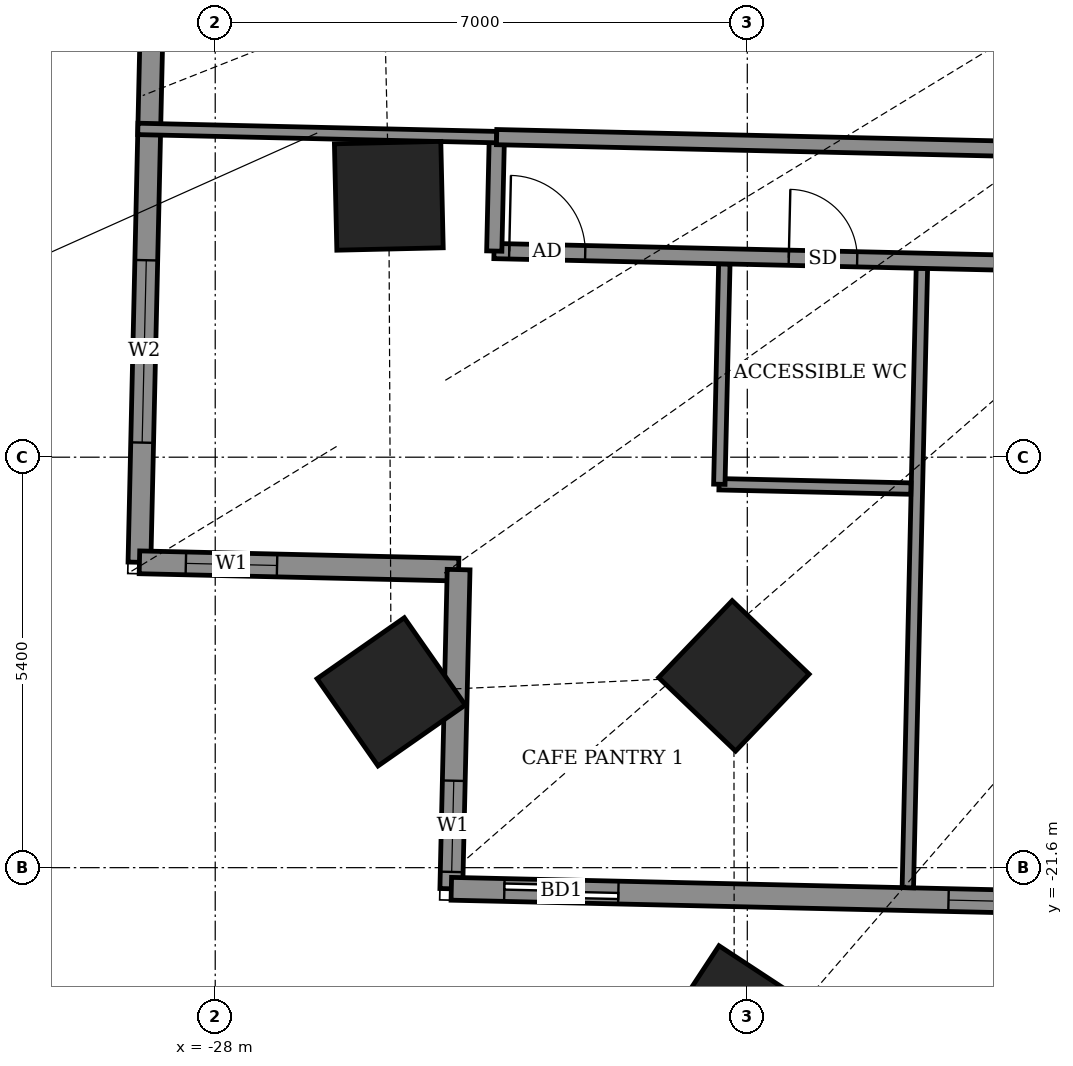
"""IFC4 building model, lengths in metres.
Left out: names, types, materials, properties, quantities, classifications, styles, units other than length and angle.
Written with IfcOpenShell. Run it as: python <this file> out.ifc"""

import sys

from ifc_helpers import new_model, si_unit, direction, frame, frame_2d, origin, origin_2d, place, context, subcontext, project, spatial, rectangle, extrude, element, fill, save


model = new_model("IFC4")
c1 = context("Model", 3, precision=1e-05, world=origin(), true_north=direction((0.0, 1.0)))
c2 = subcontext(c1, "Body", "Model", "MODEL_VIEW")
j1 = project(units=[si_unit("LENGTHUNIT", "METRE"), si_unit("PLANEANGLEUNIT", "RADIAN")], contexts=[c1])
p1 = place(None, origin())
s1 = spatial("IfcSite", under=j1, at=p1, CompositionType="ELEMENT")
p2 = place(p1, origin())
s2 = spatial("IfcBuilding", under=s1, at=p2, CompositionType="ELEMENT")
p3 = place(p2, frame((0.0, 0.0, 97.3)))
s3 = spatial("IfcBuildingStorey", under=s2, at=p3, CompositionType="ELEMENT", Elevation=97.3)
for number, where, z_axis, x_axis in (
    (1, (-25.716, -12.761, -0.55), (0.0, 0.0, 1.0), (0.023, -1.0, 0.0)),
    (2, (-25.685, -19.287, -0.55), (0.0, 0.0, 1.0), (0.573, -0.82, 0.0)),
    (3, (-21.177, -19.077, -0.55), (0.0, 0.0, 1.0), (0.723, -0.691, 0.0)),
    (4, (-21.172, -23.597, -0.55), (0.0, 0.0, 1.0), (0.836, -0.549, 0.0)),
):
    element("IfcColumn", number, at=place(p3, frame(where, z_axis=z_axis, x_axis=x_axis)), inside=s3, PredefinedType="COLUMN", context=c2, shape_type="SweptSolid", body=[
        extrude(rectangle(XDim=1.4, YDim=1.4, at=origin_2d()), origin(), (0.0, 0.0, 1.0), 4.6),
    ])
p4 = place(p3, frame((-28.702, -4.557, 0.0), z_axis=(0.0, 0.0, 1.0), x_axis=(-0.022653729471, -0.999743371341, 0.0)))
e5 = element("IfcWall", 5, at=p4, inside=s3, PredefinedType="SOLIDWALL", context=c2, shape_type="SweptSolid", body=[
    extrude(rectangle(XDim=13.03, YDim=0.3, at=frame_2d((6.515, 0.0))), origin(), (0.0, 0.0, 1.0), 2.85),
])
p5 = place(p4, frame((2.942, 0.0, 0.0)))
e6 = element("IfcOpeningElement", 6, at=p5, cuts=e5, PredefinedType="OPENING", context=c2, shape_type="SweptSolid", body=[
    extrude(rectangle(XDim=1.5, YDim=2.4, at=frame_2d((0.75, 1.2))), frame((0.0, 0.16, 0.0), z_axis=(0.0, -1.0, 0.0), x_axis=(1.0, 0.0, 0.0)), (0.0, 0.0, 1.0), 0.32),
])
p6 = place(p4, frame((9.054, 0.0, 0.9)))
e7 = element("IfcOpeningElement", 7, at=p6, cuts=e5, PredefinedType="OPENING", context=c2, shape_type="SweptSolid", body=[
    extrude(rectangle(XDim=2.4, YDim=1.5, at=frame_2d((1.2, 0.75))), frame((0.0, 0.16, 0.0), z_axis=(0.0, -1.0, 0.0), x_axis=(1.0, 0.0, 0.0)), (0.0, 0.0, 1.0), 0.32),
])
p7 = place(p3, frame((-28.997, -17.583, 0.0), z_axis=(0.0, 0.0, 1.0), x_axis=(0.999739037152, -0.022844202663, 0.0)))
e8 = element("IfcWall", 8, at=p7, inside=s3, PredefinedType="SOLIDWALL", context=c2, shape_type="SweptSolid", body=[
    extrude(rectangle(XDim=4.2, YDim=0.3, at=frame_2d((2.1, 0.0))), origin(), (0.0, 0.0, 1.0), 2.55),
])
p8 = place(p7, frame((0.611, 0.0, 0.9)))
e9 = element("IfcOpeningElement", 9, at=p8, cuts=e8, PredefinedType="OPENING", context=c2, shape_type="SweptSolid", body=[
    extrude(rectangle(XDim=1.2, YDim=1.5, at=frame_2d((0.6, 0.75))), frame((0.0, 0.16, 0.0), z_axis=(0.0, -1.0, 0.0), x_axis=(1.0, 0.0, 0.0)), (0.0, 0.0, 1.0), 0.32),
])
p9 = place(p3, frame((-24.798, -17.679, 0.0), z_axis=(0.0, 0.0, 1.0), x_axis=(-0.022844202663, -0.999739037152, 0.0)))
e10 = element("IfcWall", 10, at=p9, inside=s3, PredefinedType="SOLIDWALL", context=c2, shape_type="SweptSolid", body=[
    extrude(rectangle(XDim=4.2, YDim=0.3, at=frame_2d((2.1, 0.0))), origin(), (0.0, 0.0, 1.0), 2.55),
])
p10 = place(p9, frame((2.778, 0.0, 0.9)))
e11 = element("IfcOpeningElement", 11, at=p10, cuts=e10, PredefinedType="OPENING", context=c2, shape_type="SweptSolid", body=[
    extrude(rectangle(XDim=1.2, YDim=1.5, at=frame_2d((0.6, 0.75))), frame((0.0, 0.16, 0.0), z_axis=(0.0, -1.0, 0.0), x_axis=(1.0, 0.0, 0.0)), (0.0, 0.0, 1.0), 0.32),
])
p11 = place(p3, frame((-24.894, -21.878, 0.0), z_axis=(0.0, 0.0, 1.0), x_axis=(0.999742689045, -0.022683820265, 0.0)))
e12 = element("IfcWall", 12, at=p11, inside=s3, PredefinedType="SOLIDWALL", context=c2, shape_type="SweptSolid", body=[
    extrude(rectangle(XDim=44.708, YDim=0.3, at=frame_2d((22.354, 0.0))), origin(), (0.0, 0.0, 1.0), 2.45),
])
p12 = place(p11, frame((0.698, 0.0, 0.0)))
e13 = element("IfcOpeningElement", 13, at=p12, cuts=e12, PredefinedType="OPENING", context=c2, shape_type="SweptSolid", body=[
    extrude(rectangle(XDim=1.5, YDim=2.4, at=frame_2d((0.75, 1.2))), frame((0.0, 0.16, 0.0), z_axis=(0.0, -1.0, 0.0), x_axis=(1.0, 0.0, 0.0)), (0.0, 0.0, 1.0), 0.32),
])
p13 = place(p11, frame((6.543, 0.0, 0.9)))
e14 = element("IfcOpeningElement", 14, at=p13, cuts=e12, PredefinedType="OPENING", context=c2, shape_type="SweptSolid", body=[
    extrude(rectangle(XDim=2.4, YDim=1.5, at=frame_2d((1.2, 0.75))), frame((0.0, 0.16, 0.0), z_axis=(0.0, -1.0, 0.0), x_axis=(1.0, 0.0, 0.0)), (0.0, 0.0, 1.0), 0.32),
])
p14 = place(p11, frame((18.48, 0.0, 0.9)))
e15 = element("IfcOpeningElement", 15, at=p14, cuts=e12, PredefinedType="OPENING", context=c2, shape_type="SweptSolid", body=[
    extrude(rectangle(XDim=2.4, YDim=1.5, at=frame_2d((1.2, 0.75))), frame((0.0, 0.16, 0.0), z_axis=(0.0, -1.0, 0.0), x_axis=(1.0, 0.0, 0.0)), (0.0, 0.0, 1.0), 0.32),
])
p15 = place(p11, frame((24.76, 0.0, 0.0)))
e16 = element("IfcOpeningElement", 16, at=p15, cuts=e12, PredefinedType="OPENING", context=c2, shape_type="SweptSolid", body=[
    extrude(rectangle(XDim=1.5, YDim=2.4, at=frame_2d((0.75, 1.2))), frame((0.0, 0.16, 0.0), z_axis=(0.0, -1.0, 0.0), x_axis=(1.0, 0.0, 0.0)), (0.0, 0.0, 1.0), 0.32),
])
p16 = place(p11, frame((27.61, 0.0, 0.0)))
e17 = element("IfcOpeningElement", 17, at=p16, cuts=e12, PredefinedType="OPENING", context=c2, shape_type="SweptSolid", body=[
    extrude(rectangle(XDim=1.5, YDim=2.4, at=frame_2d((0.75, 1.2))), frame((0.0, 0.16, 0.0), z_axis=(0.0, -1.0, 0.0), x_axis=(1.0, 0.0, 0.0)), (0.0, 0.0, 1.0), 0.32),
])
p17 = place(p11, frame((33.44, 0.0, 0.0)))
e18 = element("IfcOpeningElement", 18, at=p17, cuts=e12, PredefinedType="OPENING", context=c2, shape_type="SweptSolid", body=[
    extrude(rectangle(XDim=1.5, YDim=2.4, at=frame_2d((0.75, 1.2))), frame((0.0, 0.16, 0.0), z_axis=(0.0, -1.0, 0.0), x_axis=(1.0, 0.0, 0.0)), (0.0, 0.0, 1.0), 0.32),
])
p18 = place(p11, frame((38.795, 0.0, 0.9)))
e19 = element("IfcOpeningElement", 19, at=p18, cuts=e12, PredefinedType="OPENING", context=c2, shape_type="SweptSolid", body=[
    extrude(rectangle(XDim=2.4, YDim=1.5, at=frame_2d((1.2, 0.75))), frame((0.0, 0.16, 0.0), z_axis=(0.0, -1.0, 0.0), x_axis=(1.0, 0.0, 0.0)), (0.0, 0.0, 1.0), 0.32),
])
p19 = place(p3, frame((-18.888, -21.864, 0.0), z_axis=(0.0, 0.0, 1.0), x_axis=(0.022706435224, 0.999742175663, 0.0)))
e20 = element("IfcWall", 20, at=p19, inside=s3, PredefinedType="PARTITIONING", context=c2, shape_type="SweptSolid", body=[
    extrude(rectangle(XDim=8.15, YDim=0.15, at=frame_2d((4.075, 0.0))), origin(), (0.0, 0.0, 1.0), 2.45),
])
p20 = place(p3, frame((-21.372, -16.556, 0.0), z_axis=(0.0, 0.0, 1.0), x_axis=(0.999743977673, -0.022626955293, 0.0)))
e21 = element("IfcWall", 21, at=p20, inside=s3, PredefinedType="PARTITIONING", context=c2, shape_type="SweptSolid", body=[
    extrude(rectangle(XDim=2.525, YDim=0.15, at=frame_2d((1.262, 0.0))), origin(), (0.0, 0.0, 1.0), 2.85),
])
p21 = place(p3, frame((-21.368, -16.556, 0.0), z_axis=(0.0, 0.0, 1.0), x_axis=(0.022732880677, 0.999741574676, 0.0)))
e22 = element("IfcWall", 22, at=p21, inside=s3, PredefinedType="PARTITIONING", context=c2, shape_type="SweptSolid", body=[
    extrude(rectangle(XDim=2.9, YDim=0.15, at=frame_2d((1.45, 0.0))), origin(), (0.0, 0.0, 1.0), 2.75),
])
p22 = place(p3, frame((-24.332, -13.488, 0.0), z_axis=(0.0, 0.0, 1.0), x_axis=(0.999742555853, -0.022689689667, 0.0)))
e23 = element("IfcWall", 23, at=p22, inside=s3, PredefinedType="PARTITIONING", context=c2, shape_type="SweptSolid", body=[
    extrude(rectangle(XDim=48.086, YDim=0.2, at=frame_2d((24.043, 0.0))), origin(), (0.0, 0.0, 1.0), 2.45),
])
p23 = place(p22, frame((0.2, 0.0, 0.0)))
e24 = element("IfcOpeningElement", 24, at=p23, cuts=e23, PredefinedType="OPENING", context=c2, shape_type="SweptSolid", body=[
    extrude(rectangle(XDim=1.0, YDim=2.1, at=frame_2d((0.5, 1.05))), frame((0.0, 0.11, 0.0), z_axis=(0.0, -1.0, 0.0), x_axis=(1.0, 0.0, 0.0)), (0.0, 0.0, 1.0), 0.22),
])
p24 = place(p22, frame((3.879, 0.0, 0.0)))
e25 = element("IfcOpeningElement", 25, at=p24, cuts=e23, PredefinedType="OPENING", context=c2, shape_type="SweptSolid", body=[
    extrude(rectangle(XDim=0.9, YDim=2.1, at=frame_2d((0.45, 1.05))), frame((0.0, 0.11, 0.0), z_axis=(0.0, -1.0, 0.0), x_axis=(1.0, 0.0, 0.0)), (0.0, 0.0, 1.0), 0.22),
])
p25 = place(p22, frame((8.929, 0.0, 0.0)))
e26 = element("IfcOpeningElement", 26, at=p25, cuts=e23, PredefinedType="OPENING", context=c2, shape_type="SweptSolid", body=[
    extrude(rectangle(XDim=1.0, YDim=2.1, at=frame_2d((0.5, 1.05))), frame((0.0, 0.11, 0.0), z_axis=(0.0, -1.0, 0.0), x_axis=(1.0, 0.0, 0.0)), (0.0, 0.0, 1.0), 0.22),
])
p26 = place(p22, frame((17.004, 0.0, 0.0)))
e27 = element("IfcOpeningElement", 27, at=p26, cuts=e23, PredefinedType="OPENING", context=c2, shape_type="SweptSolid", body=[
    extrude(rectangle(XDim=1.0, YDim=2.1, at=frame_2d((0.5, 1.05))), frame((0.0, 0.11, 0.0), z_axis=(0.0, -1.0, 0.0), x_axis=(1.0, 0.0, 0.0)), (0.0, 0.0, 1.0), 0.22),
])
p27 = place(p22, frame((25.054, 0.0, 0.0)))
e28 = element("IfcOpeningElement", 28, at=p27, cuts=e23, PredefinedType="OPENING", context=c2, shape_type="SweptSolid", body=[
    extrude(rectangle(XDim=0.9, YDim=2.1, at=frame_2d((0.45, 1.05))), frame((0.0, 0.11, 0.0), z_axis=(0.0, -1.0, 0.0), x_axis=(1.0, 0.0, 0.0)), (0.0, 0.0, 1.0), 0.22),
])
p28 = place(p22, frame((27.679, 0.0, 0.0)))
e29 = element("IfcOpeningElement", 29, at=p28, cuts=e23, PredefinedType="OPENING", context=c2, shape_type="SweptSolid", body=[
    extrude(rectangle(XDim=0.9, YDim=2.1, at=frame_2d((0.45, 1.05))), frame((0.0, 0.11, 0.0), z_axis=(0.0, -1.0, 0.0), x_axis=(1.0, 0.0, 0.0)), (0.0, 0.0, 1.0), 0.22),
])
p29 = place(p22, frame((35.079, 0.0, 0.0)))
e30 = element("IfcOpeningElement", 30, at=p29, cuts=e23, PredefinedType="OPENING", context=c2, shape_type="SweptSolid", body=[
    extrude(rectangle(XDim=0.9, YDim=2.1, at=frame_2d((0.45, 1.05))), frame((0.0, 0.11, 0.0), z_axis=(0.0, -1.0, 0.0), x_axis=(1.0, 0.0, 0.0)), (0.0, 0.0, 1.0), 0.22),
])
p30 = place(p22, frame((41.675, 0.0, 0.0)))
e31 = element("IfcOpeningElement", 31, at=p30, cuts=e23, PredefinedType="OPENING", context=c2, shape_type="SweptSolid", body=[
    extrude(rectangle(XDim=1.0, YDim=2.1, at=frame_2d((0.5, 1.05))), frame((0.0, 0.11, 0.0), z_axis=(0.0, -1.0, 0.0), x_axis=(1.0, 0.0, 0.0)), (0.0, 0.0, 1.0), 0.22),
])
p31 = place(p3, frame((-24.329, -13.488, 0.0), z_axis=(0.0, 0.0, 1.0), x_axis=(0.02279537805, 0.999740151609, 0.0)))
e32 = element("IfcWall", 32, at=p31, inside=s3, PredefinedType="PARTITIONING", context=c2, shape_type="SweptSolid", body=[
    extrude(rectangle(XDim=1.5, YDim=0.2, at=frame_2d((0.75, 0.0))), origin(), (0.0, 0.0, 1.0), 4.05),
])
p32 = place(p3, frame((-29.018, -11.881, 0.0), z_axis=(0.0, 0.0, 1.0), x_axis=(0.999738756298, -0.022856490471, 0.0)))
e33 = element("IfcWall", 33, at=p32, inside=s3, PredefinedType="PARTITIONING", context=c2, shape_type="SweptSolid", body=[
    extrude(rectangle(XDim=4.721, YDim=0.15, at=frame_2d((2.361, 0.0))), origin(), (0.0, 0.0, 1.0), 2.55),
])
p33 = place(p3, frame((-24.298, -11.989, 0.0), z_axis=(0.0, 0.0, 1.0), x_axis=(0.999742853322, -0.022676578901, 0.0)))
e34 = element("IfcWall", 34, at=p33, inside=s3, PredefinedType="PARTITIONING", context=c2, shape_type="SweptSolid", body=[
    extrude(rectangle(XDim=7.052, YDim=0.2, at=frame_2d((3.526, 0.0))), origin(), (0.0, 0.0, 1.0), 2.75),
])
p34 = place(p6, origin())
e35 = element("IfcWindow", 35, at=p34, inside=s3, PartitioningType="DOUBLE_PANEL_VERTICAL", PredefinedType="WINDOW", context=c2, shape_type="SweptSolid", body=[
    extrude(rectangle(XDim=2.4, YDim=1.5, at=frame_2d((1.2, 0.75))), frame((0.0, 0.03, 0.0), z_axis=(0.0, -1.0, 0.0), x_axis=(1.0, 0.0, 0.0)), (0.0, 0.0, 1.0), 0.06),
])
fill(e7, e35)
p35 = place(p8, origin())
e36 = element("IfcWindow", 36, at=p35, inside=s3, PartitioningType="SINGLE_PANEL", PredefinedType="WINDOW", context=c2, shape_type="SweptSolid", body=[
    extrude(rectangle(XDim=1.2, YDim=1.5, at=frame_2d((0.6, 0.75))), frame((0.0, 0.03, 0.0), z_axis=(0.0, -1.0, 0.0), x_axis=(1.0, 0.0, 0.0)), (0.0, 0.0, 1.0), 0.06),
])
fill(e9, e36)
p36 = place(p10, origin())
e37 = element("IfcWindow", 37, at=p36, inside=s3, PartitioningType="SINGLE_PANEL", PredefinedType="WINDOW", context=c2, shape_type="SweptSolid", body=[
    extrude(rectangle(XDim=1.2, YDim=1.5, at=frame_2d((0.6, 0.75))), frame((0.0, 0.03, 0.0), z_axis=(0.0, -1.0, 0.0), x_axis=(1.0, 0.0, 0.0)), (0.0, 0.0, 1.0), 0.06),
])
fill(e11, e37)
p37 = place(p12, origin())
e38 = element("IfcDoor", 38, at=p37, inside=s3, OperationType="SLIDING_TO_LEFT", PredefinedType="DOOR", context=c2, shape_type="SweptSolid", body=[
    extrude(rectangle(XDim=1.5, YDim=2.4, at=frame_2d((0.75, 1.2))), frame((0.0, 0.025, 0.0), z_axis=(0.0, -1.0, 0.0), x_axis=(1.0, 0.0, 0.0)), (0.0, 0.0, 1.0), 0.05),
])
fill(e13, e38)
p38 = place(p13, origin())
e39 = element("IfcWindow", 39, at=p38, inside=s3, PartitioningType="DOUBLE_PANEL_VERTICAL", PredefinedType="WINDOW", context=c2, shape_type="SweptSolid", body=[
    extrude(rectangle(XDim=2.4, YDim=1.5, at=frame_2d((1.2, 0.75))), frame((0.0, 0.03, 0.0), z_axis=(0.0, -1.0, 0.0), x_axis=(1.0, 0.0, 0.0)), (0.0, 0.0, 1.0), 0.06),
])
fill(e14, e39)
p39 = place(p23, origin())
e40 = element("IfcDoor", 40, at=p39, inside=s3, OperationType="SINGLE_SWING_LEFT", PredefinedType="DOOR", context=c2, shape_type="SweptSolid", body=[
    extrude(rectangle(XDim=1.0, YDim=2.1, at=frame_2d((0.5, 1.05))), frame((0.0, 0.025, 0.0), z_axis=(0.0, -1.0, 0.0), x_axis=(1.0, 0.0, 0.0)), (0.0, 0.0, 1.0), 0.05),
])
fill(e24, e40)
p40 = place(p24, origin())
e41 = element("IfcDoor", 41, at=p40, inside=s3, OperationType="SINGLE_SWING_LEFT", PredefinedType="DOOR", context=c2, shape_type="SweptSolid", body=[
    extrude(rectangle(XDim=0.9, YDim=2.1, at=frame_2d((0.45, 1.05))), frame((0.0, 0.025, 0.0), z_axis=(0.0, -1.0, 0.0), x_axis=(1.0, 0.0, 0.0)), (0.0, 0.0, 1.0), 0.05),
])
fill(e25, e41)
save(model, sys.argv[1])
